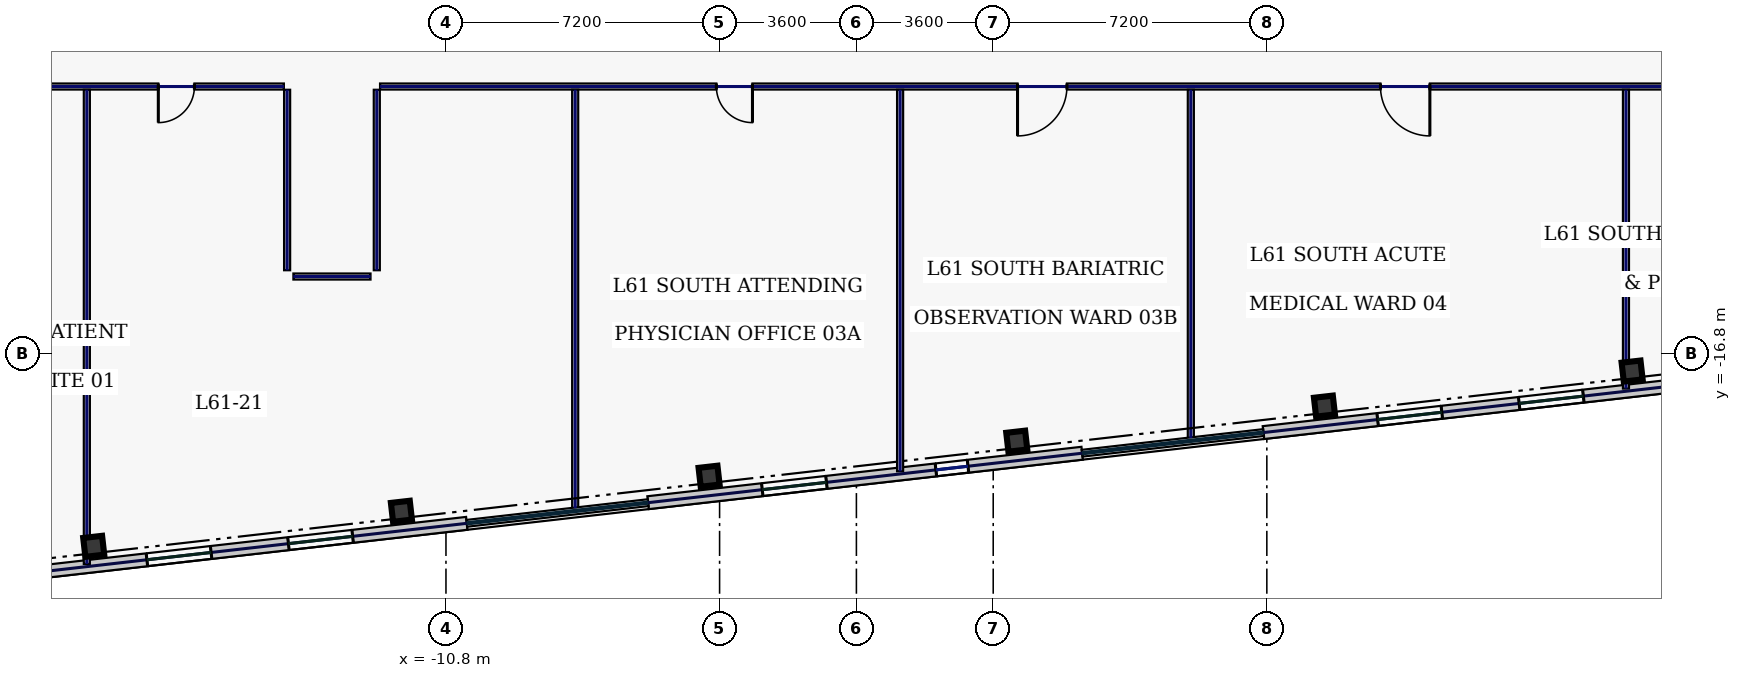
"""IFC4 building model, lengths in metres.
Left out: names, types, materials, properties, quantities, classifications, styles, units other than length and angle.
Written with IfcOpenShell. Run it as: python <this file> out.ifc"""

import sys

from ifc_helpers import new_model, si_unit, direction, frame, frame_2d, origin, origin_2d, place, context, subcontext, project, spatial, rectangle, hollow_rectangle, extrude, element, fill, save


model = new_model("IFC4")
c1 = context("Model", 3, precision=1e-05, world=origin(), true_north=direction((0.0, 1.0)))
c2 = subcontext(c1, "Body", "Model", "MODEL_VIEW")
j1 = project(units=[si_unit("LENGTHUNIT", "METRE"), si_unit("PLANEANGLEUNIT", "RADIAN")], contexts=[c1])
p1 = place(None, origin())
s1 = spatial("IfcSite", under=j1, at=p1, CompositionType="ELEMENT")
p2 = place(p1, origin())
s2 = spatial("IfcBuilding", under=s1, at=p2, CompositionType="ELEMENT")
p3 = place(p2, frame((0.0, 0.0, 263.0)))
s3 = spatial("IfcBuildingStorey", under=s2, at=p3, CompositionType="ELEMENT", Elevation=263.0)
for number, where, z_axis, x_axis in (
    (1, (-20.069, -21.88, 0.0), (0.0, 0.0, 1.0), (0.994, 0.113, 0.0)),
    (2, (-11.972, -20.958, 0.0), (0.0, 0.0, 1.0), (0.994, 0.113, 0.0)),
    (3, (-3.876, -20.035, 0.0), (0.0, 0.0, 1.0), (0.994, 0.113, 0.0)),
    (4, (4.22, -19.113, 0.0), (0.0, 0.0, 1.0), (0.994, 0.113, 0.0)),
    (5, (12.316, -18.19, 0.0), (0.0, 0.0, 1.0), (0.994, 0.113, 0.0)),
    (6, (20.412, -17.268, 0.0), (0.0, 0.0, 1.0), (0.994, 0.113, 0.0)),
):
    element("IfcColumn", number, at=place(p3, frame(where, z_axis=z_axis, x_axis=x_axis)), inside=s3, PredefinedType="COLUMN", context=c2, shape_type="SweptSolid", body=[
        extrude(hollow_rectangle(XDim=0.5, YDim=0.5, WallThickness=0.025, at=origin_2d()), origin(), (0.0, 0.0, 1.0), 3.74),
    ])
p4 = place(p3, frame((-28.783, -23.386, 0.0), z_axis=(0.0, 0.0, 1.0), x_axis=(0.993572271362, 0.113199565282, 0.0)))
e7 = element("IfcWall", 7, at=p4, inside=s3, PredefinedType="STANDARD", context=c2, shape_type="SweptSolid", body=[
    extrude(rectangle(XDim=18.651, YDim=0.34, at=frame_2d((9.326, 0.0))), origin(), (0.0, 0.0, 1.0), 3.74),
])
p5 = place(p4, frame((2.03, 0.0, 0.88)))
e8 = element("IfcOpeningElement", 8, at=p5, cuts=e7, PredefinedType="OPENING", context=c2, shape_type="SweptSolid", body=[
    extrude(rectangle(XDim=0.85, YDim=1.85, at=frame_2d((0.425, 0.925))), frame((0.0, 0.18, 0.0), z_axis=(0.0, -1.0, 0.0), x_axis=(1.0, 0.0, 0.0)), (0.0, 0.0, 1.0), 0.36),
])
p6 = place(p4, frame((5.779, 0.0, 0.88)))
e9 = element("IfcOpeningElement", 9, at=p6, cuts=e7, PredefinedType="OPENING", context=c2, shape_type="SweptSolid", body=[
    extrude(rectangle(XDim=1.7, YDim=1.95, at=frame_2d((0.85, 0.975))), frame((0.0, 0.18, 0.0), z_axis=(0.0, -1.0, 0.0), x_axis=(1.0, 0.0, 0.0)), (0.0, 0.0, 1.0), 0.36),
])
p7 = place(p4, frame((10.179, 0.0, 0.88)))
e10 = element("IfcOpeningElement", 10, at=p7, cuts=e7, PredefinedType="OPENING", context=c2, shape_type="SweptSolid", body=[
    extrude(rectangle(XDim=1.7, YDim=1.95, at=frame_2d((0.85, 0.975))), frame((0.0, 0.18, 0.0), z_axis=(0.0, -1.0, 0.0), x_axis=(1.0, 0.0, 0.0)), (0.0, 0.0, 1.0), 0.36),
])
p8 = place(p4, frame((13.927, 0.0, 0.88)))
e11 = element("IfcOpeningElement", 11, at=p8, cuts=e7, PredefinedType="OPENING", context=c2, shape_type="SweptSolid", body=[
    extrude(rectangle(XDim=1.7, YDim=1.95, at=frame_2d((0.85, 0.975))), frame((0.0, 0.18, 0.0), z_axis=(0.0, -1.0, 0.0), x_axis=(1.0, 0.0, 0.0)), (0.0, 0.0, 1.0), 0.36),
])
p9 = place(p3, frame((-5.482, -20.731, 0.0), z_axis=(0.0, 0.0, 1.0), x_axis=(0.993571968199, 0.113202226169, 0.0)))
e12 = element("IfcWall", 12, at=p9, inside=s3, PredefinedType="STANDARD", context=c2, shape_type="SweptSolid", body=[
    extrude(rectangle(XDim=11.497, YDim=0.34, at=frame_2d((5.749, 0.0))), origin(), (0.0, 0.0, 1.0), 3.74),
])
p10 = place(p9, frame((3.024, 0.0, 0.88)))
e13 = element("IfcOpeningElement", 13, at=p10, cuts=e12, PredefinedType="OPENING", context=c2, shape_type="SweptSolid", body=[
    extrude(rectangle(XDim=1.7, YDim=1.95, at=frame_2d((0.85, 0.975))), frame((0.0, 0.18, 0.0), z_axis=(0.0, -1.0, 0.0), x_axis=(1.0, 0.0, 0.0)), (0.0, 0.0, 1.0), 0.36),
])
p11 = place(p9, frame((7.623, 0.0, 0.88)))
e14 = element("IfcOpeningElement", 14, at=p11, cuts=e12, PredefinedType="OPENING", context=c2, shape_type="SweptSolid", body=[
    extrude(rectangle(XDim=0.85, YDim=1.85, at=frame_2d((0.425, 0.925))), frame((0.0, 0.18, 0.0), z_axis=(0.0, -1.0, 0.0), x_axis=(1.0, 0.0, 0.0)), (0.0, 0.0, 1.0), 0.36),
])
p12 = place(p3, frame((10.71, -18.886, 0.0), z_axis=(0.0, 0.0, 1.0), x_axis=(0.993572271362, 0.113199565282, 0.0)))
e15 = element("IfcWall", 15, at=p12, inside=s3, PredefinedType="STANDARD", context=c2, shape_type="SweptSolid", body=[
    extrude(rectangle(XDim=18.651, YDim=0.34, at=frame_2d((9.326, 0.0))), origin(), (0.0, 0.0, 1.0), 3.74),
])
p13 = place(p12, frame((3.024, 0.0, 0.88)))
e16 = element("IfcOpeningElement", 16, at=p13, cuts=e15, PredefinedType="OPENING", context=c2, shape_type="SweptSolid", body=[
    extrude(rectangle(XDim=1.7, YDim=1.95, at=frame_2d((0.85, 0.975))), frame((0.0, 0.18, 0.0), z_axis=(0.0, -1.0, 0.0), x_axis=(1.0, 0.0, 0.0)), (0.0, 0.0, 1.0), 0.36),
])
p14 = place(p12, frame((6.773, 0.0, 0.88)))
e17 = element("IfcOpeningElement", 17, at=p14, cuts=e15, PredefinedType="OPENING", context=c2, shape_type="SweptSolid", body=[
    extrude(rectangle(XDim=1.7, YDim=1.95, at=frame_2d((0.85, 0.975))), frame((0.0, 0.18, 0.0), z_axis=(0.0, -1.0, 0.0), x_axis=(1.0, 0.0, 0.0)), (0.0, 0.0, 1.0), 0.36),
])
p15 = place(p12, frame((11.173, 0.0, 0.88)))
e18 = element("IfcOpeningElement", 18, at=p15, cuts=e15, PredefinedType="OPENING", context=c2, shape_type="SweptSolid", body=[
    extrude(rectangle(XDim=1.7, YDim=1.95, at=frame_2d((0.85, 0.975))), frame((0.0, 0.18, 0.0), z_axis=(0.0, -1.0, 0.0), x_axis=(1.0, 0.0, 0.0)), (0.0, 0.0, 1.0), 0.36),
])
p16 = place(p12, frame((14.921, 0.0, 0.88)))
e19 = element("IfcOpeningElement", 19, at=p16, cuts=e15, PredefinedType="OPENING", context=c2, shape_type="SweptSolid", body=[
    extrude(rectangle(XDim=1.7, YDim=1.95, at=frame_2d((0.85, 0.975))), frame((0.0, 0.18, 0.0), z_axis=(0.0, -1.0, 0.0), x_axis=(1.0, 0.0, 0.0)), (0.0, 0.0, 1.0), 0.36),
])
p17 = place(p3, frame((24.815, -9.78, 0.0), z_axis=(0.0, 0.0, 1.0), x_axis=(-1.0, 0.0, 0.0)))
e20 = element("IfcWall", 20, at=p17, inside=s3, PredefinedType="PARTITIONING", context=c2, shape_type="SweptSolid", body=[
    extrude(rectangle(XDim=37.35, YDim=0.16, at=frame_2d((18.675, 0.0))), origin(), (0.0, 0.0, 1.0), 3.74),
])
p18 = place(p17, frame((27.55, 0.0, 0.0)))
e21 = element("IfcOpeningElement", 21, at=p18, cuts=e20, PredefinedType="OPENING", context=c2, shape_type="SweptSolid", body=[
    extrude(rectangle(XDim=0.95, YDim=2.2, at=frame_2d((0.475, 1.1))), frame((0.0, 0.09, 0.0), z_axis=(0.0, -1.0, 0.0), x_axis=(1.0, 0.0, 0.0)), (0.0, 0.0, 1.0), 0.18),
])
p19 = place(p17, frame((19.275, 0.0, 0.0)))
e22 = element("IfcOpeningElement", 22, at=p19, cuts=e20, PredefinedType="OPENING", context=c2, shape_type="SweptSolid", body=[
    extrude(rectangle(XDim=1.3, YDim=2.2, at=frame_2d((0.65, 1.1))), frame((0.0, 0.09, 0.0), z_axis=(0.0, -1.0, 0.0), x_axis=(1.0, 0.0, 0.0)), (0.0, 0.0, 1.0), 0.18),
])
p20 = place(p17, frame((9.725, 0.0, 0.0)))
e23 = element("IfcOpeningElement", 23, at=p20, cuts=e20, PredefinedType="OPENING", context=c2, shape_type="SweptSolid", body=[
    extrude(rectangle(XDim=1.3, YDim=2.2, at=frame_2d((0.65, 1.1))), frame((0.0, 0.09, 0.0), z_axis=(0.0, -1.0, 0.0), x_axis=(1.0, 0.0, 0.0)), (0.0, 0.0, 1.0), 0.18),
])
p21 = place(p17, frame((2.044, 0.0, 0.0)))
e24 = element("IfcOpeningElement", 24, at=p21, cuts=e20, PredefinedType="OPENING", context=c2, shape_type="SweptSolid", body=[
    extrude(rectangle(XDim=0.95, YDim=2.2, at=frame_2d((0.475, 1.1))), frame((0.0, 0.09, 0.0), z_axis=(0.0, -1.0, 0.0), x_axis=(1.0, 0.0, 0.0)), (0.0, 0.0, 1.0), 0.18),
])
p22 = place(p3, frame((-12.62, -9.865, 0.0), z_axis=(0.0, 0.0, 1.0), x_axis=(0.0, -1.0, 0.0)))
e25 = element("IfcWall", 25, at=p22, inside=s3, PredefinedType="PARTITIONING", context=c2, shape_type="SweptSolid", body=[
    extrude(rectangle(XDim=4.75, YDim=0.16, at=frame_2d((2.375, 0.0))), origin(), (0.0, 0.0, 1.0), 3.74),
])
p23 = place(p3, frame((-12.785, -14.78, 0.0), z_axis=(0.0, 0.0, 1.0), x_axis=(-1.0, 0.0, 0.0)))
e26 = element("IfcWall", 26, at=p23, inside=s3, PredefinedType="PARTITIONING", context=c2, shape_type="SweptSolid", body=[
    extrude(rectangle(XDim=2.03, YDim=0.16, at=frame_2d((1.015, 0.0))), origin(), (0.0, 0.0, 1.0), 3.74),
])
p24 = place(p3, frame((-14.98, -14.615, 0.0), z_axis=(0.0, 0.0, 1.0), x_axis=(0.0, 1.0, 0.0)))
e27 = element("IfcWall", 27, at=p24, inside=s3, PredefinedType="PARTITIONING", context=c2, shape_type="SweptSolid", body=[
    extrude(rectangle(XDim=4.75, YDim=0.16, at=frame_2d((2.375, 0.0))), origin(), (0.0, 0.0, 1.0), 3.74),
])
p25 = place(p3, frame((-15.065, -9.78, 0.0), z_axis=(0.0, 0.0, 1.0), x_axis=(-1.0, 0.0, 0.0)))
e28 = element("IfcWall", 28, at=p25, inside=s3, PredefinedType="PARTITIONING", context=c2, shape_type="SweptSolid", body=[
    extrude(rectangle(XDim=9.75, YDim=0.16, at=frame_2d((4.875, 0.0))), origin(), (0.0, 0.0, 1.0), 3.74),
])
p26 = place(p25, frame((6.926, 0.0, 0.0)))
e29 = element("IfcOpeningElement", 29, at=p26, cuts=e28, PredefinedType="OPENING", context=c2, shape_type="SweptSolid", body=[
    extrude(rectangle(XDim=0.95, YDim=2.2, at=frame_2d((0.475, 1.1))), frame((0.0, 0.09, 0.0), z_axis=(0.0, -1.0, 0.0), x_axis=(1.0, 0.0, 0.0)), (0.0, 0.0, 1.0), 0.18),
])
p27 = place(p25, frame((2.354, 0.0, 0.0)))
e30 = element("IfcOpeningElement", 30, at=p27, cuts=e28, PredefinedType="OPENING", context=c2, shape_type="SweptSolid", body=[
    extrude(rectangle(XDim=0.95, YDim=2.2, at=frame_2d((0.475, 1.1))), frame((0.0, 0.09, 0.0), z_axis=(0.0, -1.0, 0.0), x_axis=(1.0, 0.0, 0.0)), (0.0, 0.0, 1.0), 0.18),
])
p28 = place(p3, frame((-20.25, -22.344, 0.0), z_axis=(0.0, 0.0, 1.0), x_axis=(0.0, 1.0, 0.0)))
e31 = element("IfcWall", 31, at=p28, inside=s3, PredefinedType="PARTITIONING", context=c2, shape_type="SweptSolid", body=[
    extrude(rectangle(XDim=12.479, YDim=0.16, at=frame_2d((6.239, 0.0))), origin(), (0.0, 0.0, 1.0), 3.74),
])
p29 = place(p3, frame((-7.4, -20.879, 0.0), z_axis=(0.0, 0.0, 1.0), x_axis=(0.0, 1.0, 0.0)))
e32 = element("IfcWall", 32, at=p29, inside=s3, PredefinedType="PARTITIONING", context=c2, shape_type="SweptSolid", body=[
    extrude(rectangle(XDim=11.014, YDim=0.16, at=frame_2d((5.507, 0.0))), origin(), (0.0, 0.0, 1.0), 3.74),
])
p30 = place(p3, frame((8.8, -19.034, 0.0), z_axis=(0.0, 0.0, 1.0), x_axis=(0.0, 1.0, 0.0)))
e33 = element("IfcWall", 33, at=p30, inside=s3, PredefinedType="PARTITIONING", context=c2, shape_type="SweptSolid", body=[
    extrude(rectangle(XDim=9.169, YDim=0.16, at=frame_2d((4.584, 0.0))), origin(), (0.0, 0.0, 1.0), 3.74),
])
p31 = place(p3, frame((20.25, -17.729, 0.0), z_axis=(0.0, 0.0, 1.0), x_axis=(0.0, 1.0, 0.0)))
e34 = element("IfcWall", 34, at=p31, inside=s3, PredefinedType="PARTITIONING", context=c2, shape_type="SweptSolid", body=[
    extrude(rectangle(XDim=7.864, YDim=0.16, at=frame_2d((3.932, 0.0))), origin(), (0.0, 0.0, 1.0), 3.74),
])
p32 = place(p3, frame((1.15, -19.906, 0.0), z_axis=(0.0, 0.0, 1.0), x_axis=(0.0, 1.0, 0.0)))
e35 = element("IfcWall", 35, at=p32, inside=s3, PredefinedType="PARTITIONING", context=c2, shape_type="SweptSolid", body=[
    extrude(rectangle(XDim=10.041, YDim=0.16, at=frame_2d((5.02, 0.0))), origin(), (0.0, 0.0, 1.0), 3.74),
])
p33 = place(p7, origin())
e36 = element("IfcWindow", 36, at=p33, inside=s3, PartitioningType="SINGLE_PANEL", PredefinedType="WINDOW", context=c2, shape_type="SweptSolid", body=[
    extrude(rectangle(XDim=1.7, YDim=1.95, at=frame_2d((0.85, 0.975))), frame((0.0, 0.03, 0.0), z_axis=(0.0, -1.0, 0.0), x_axis=(1.0, 0.0, 0.0)), (0.0, 0.0, 1.0), 0.06),
])
fill(e10, e36)
p34 = place(p8, origin())
e37 = element("IfcWindow", 37, at=p34, inside=s3, PartitioningType="SINGLE_PANEL", PredefinedType="WINDOW", context=c2, shape_type="SweptSolid", body=[
    extrude(rectangle(XDim=1.7, YDim=1.95, at=frame_2d((0.85, 0.975))), frame((0.0, 0.03, 0.0), z_axis=(0.0, -1.0, 0.0), x_axis=(1.0, 0.0, 0.0)), (0.0, 0.0, 1.0), 0.06),
])
fill(e11, e37)
p35 = place(p10, origin())
e38 = element("IfcWindow", 38, at=p35, inside=s3, PartitioningType="SINGLE_PANEL", PredefinedType="WINDOW", context=c2, shape_type="SweptSolid", body=[
    extrude(rectangle(XDim=1.7, YDim=1.95, at=frame_2d((0.85, 0.975))), frame((0.0, 0.03, 0.0), z_axis=(0.0, -1.0, 0.0), x_axis=(1.0, 0.0, 0.0)), (0.0, 0.0, 1.0), 0.06),
])
fill(e13, e38)
p36 = place(p11, origin())
e39 = element("IfcWindow", 39, at=p36, inside=s3, PartitioningType="SINGLE_PANEL", PredefinedType="WINDOW", context=c2, shape_type="SweptSolid", body=[
    extrude(rectangle(XDim=0.85, YDim=1.85, at=frame_2d((0.425, 0.925))), frame((0.0, 0.03, 0.0), z_axis=(0.0, -1.0, 0.0), x_axis=(1.0, 0.0, 0.0)), (0.0, 0.0, 1.0), 0.06),
])
fill(e14, e39)
p37 = place(p13, origin())
e40 = element("IfcWindow", 40, at=p37, inside=s3, PartitioningType="SINGLE_PANEL", PredefinedType="WINDOW", context=c2, shape_type="SweptSolid", body=[
    extrude(rectangle(XDim=1.7, YDim=1.95, at=frame_2d((0.85, 0.975))), frame((0.0, 0.03, 0.0), z_axis=(0.0, -1.0, 0.0), x_axis=(1.0, 0.0, 0.0)), (0.0, 0.0, 1.0), 0.06),
])
fill(e16, e40)
p38 = place(p14, origin())
e41 = element("IfcWindow", 41, at=p38, inside=s3, PartitioningType="SINGLE_PANEL", PredefinedType="WINDOW", context=c2, shape_type="SweptSolid", body=[
    extrude(rectangle(XDim=1.7, YDim=1.95, at=frame_2d((0.85, 0.975))), frame((0.0, 0.03, 0.0), z_axis=(0.0, -1.0, 0.0), x_axis=(1.0, 0.0, 0.0)), (0.0, 0.0, 1.0), 0.06),
])
fill(e17, e41)
p39 = place(p27, origin())
e42 = element("IfcDoor", 42, at=p39, inside=s3, OperationType="SINGLE_SWING_RIGHT", PredefinedType="DOOR", context=c2, shape_type="SweptSolid", body=[
    extrude(rectangle(XDim=0.95, YDim=2.2, at=frame_2d((0.475, 1.1))), frame((0.0, 0.025, 0.0), z_axis=(0.0, -1.0, 0.0), x_axis=(1.0, 0.0, 0.0)), (0.0, 0.0, 1.0), 0.05),
])
fill(e30, e42)
p40 = place(p18, origin())
e43 = element("IfcDoor", 43, at=p40, inside=s3, OperationType="SINGLE_SWING_LEFT", PredefinedType="DOOR", context=c2, shape_type="SweptSolid", body=[
    extrude(rectangle(XDim=0.95, YDim=2.2, at=frame_2d((0.475, 1.1))), frame((0.0, 0.025, 0.0), z_axis=(0.0, -1.0, 0.0), x_axis=(1.0, 0.0, 0.0)), (0.0, 0.0, 1.0), 0.05),
])
fill(e21, e43)
p41 = place(p19, origin())
e44 = element("IfcDoor", 44, at=p41, inside=s3, OperationType="SINGLE_SWING_RIGHT", PredefinedType="DOOR", context=c2, shape_type="SweptSolid", body=[
    extrude(rectangle(XDim=1.3, YDim=2.2, at=frame_2d((0.65, 1.1))), frame((0.0, 0.025, 0.0), z_axis=(0.0, -1.0, 0.0), x_axis=(1.0, 0.0, 0.0)), (0.0, 0.0, 1.0), 0.05),
])
fill(e22, e44)
p42 = place(p20, origin())
e45 = element("IfcDoor", 45, at=p42, inside=s3, OperationType="SINGLE_SWING_LEFT", PredefinedType="DOOR", context=c2, shape_type="SweptSolid", body=[
    extrude(rectangle(XDim=1.3, YDim=2.2, at=frame_2d((0.65, 1.1))), frame((0.0, 0.025, 0.0), z_axis=(0.0, -1.0, 0.0), x_axis=(1.0, 0.0, 0.0)), (0.0, 0.0, 1.0), 0.05),
])
fill(e23, e45)
save(model, sys.argv[1])
